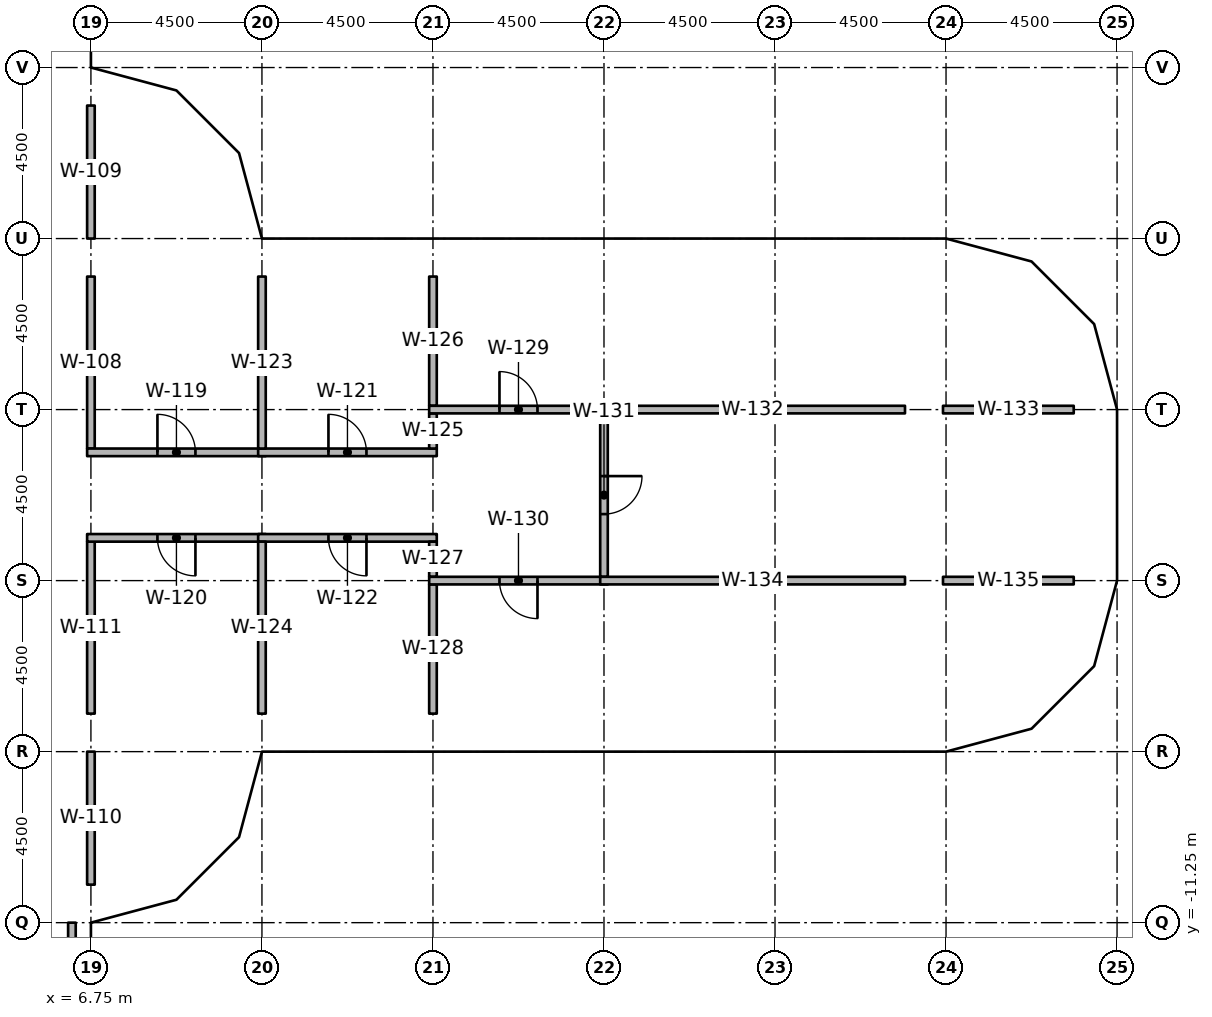
"""IFC4 building model, lengths in metres.
Left out: names, types, materials, properties, quantities, classifications, styles, units other than length and angle.
Written with IfcOpenShell. Run it as: python <this file> out.ifc"""

import sys

from ifc_helpers import new_model, si_unit, direction, frame, frame_2d, origin, origin_2d, place, context, subcontext, project, spatial, rectangle, extrude, element, fill, save


model = new_model("IFC4")
c1 = context("Model", 3, precision=1e-05, world=origin(), true_north=direction((0.0, 1.0)))
c2 = subcontext(c1, "Body", "Model", "MODEL_VIEW")
j1 = project(units=[si_unit("LENGTHUNIT", "METRE"), si_unit("PLANEANGLEUNIT", "RADIAN")], contexts=[c1])
p1 = place(None, origin())
s1 = spatial("IfcSite", under=j1, at=p1, CompositionType="ELEMENT")
p2 = place(p1, origin())
s2 = spatial("IfcBuilding", under=s1, at=p2, CompositionType="ELEMENT")
p3 = place(p2, frame((0.0, 0.0, 27.0)))
s3 = spatial("IfcBuildingStorey", under=s2, at=p3, CompositionType="ELEMENT", Elevation=27.0)
for number, where, z_axis, x_axis in (
    (1, (6.25, -10.75, 0.0), (0.0, 0.0, 1.0), (1.0, 0.0, 0.0)),
    (2, (6.25, -6.25, 0.0), (0.0, 0.0, 1.0), (1.0, 0.0, 0.0)),
    (3, (6.25, 6.25, 0.0), (0.0, 0.0, 1.0), (1.0, 0.0, 0.0)),
    (4, (6.25, 10.75, 0.0), (0.0, 0.0, 1.0), (1.0, 0.0, 0.0)),
    (5, (10.75, -6.25, 0.0), (0.0, 0.0, 1.0), (1.0, 0.0, 0.0)),
    (6, (10.75, 6.25, 0.0), (0.0, 0.0, 1.0), (1.0, 0.0, 0.0)),
    (7, (15.75, -6.25, 0.0), (0.0, 0.0, 1.0), (1.0, 0.0, 0.0)),
    (8, (15.75, 6.25, 0.0), (0.0, 0.0, 1.0), (1.0, 0.0, 0.0)),
    (9, (20.25, -6.11, 0.0), (0.0, 0.0, 1.0), (1.0, 0.0, 0.0)),
    (10, (20.25, 6.11, 0.0), (0.0, 0.0, 1.0), (1.0, 0.0, 0.0)),
    (11, (24.75, -6.11, 0.0), (0.0, 0.0, 1.0), (1.0, 0.0, 0.0)),
    (12, (24.75, 6.11, 0.0), (0.0, 0.0, 1.0), (1.0, 0.0, 0.0)),
    (13, (28.908, -5.475, 0.0), (0.0, 0.0, 1.0), (1.0, 0.0, 0.0)),
    (14, (28.67, -2.25, 0.0), (0.0, 0.0, 1.0), (1.0, 0.0, 0.0)),
    (15, (28.67, 2.25, 0.0), (0.0, 0.0, 1.0), (1.0, 0.0, 0.0)),
    (16, (28.908, 5.475, 0.0), (0.0, 0.0, 1.0), (1.0, 0.0, 0.0)),
    (17, (33.11, -2.25, 0.0), (0.0, 0.0, 1.0), (1.0, 0.0, 0.0)),
    (18, (33.11, 2.25, 0.0), (0.0, 0.0, 1.0), (1.0, 0.0, 0.0)),
):
    element("IfcColumn", number, at=place(p3, frame(where, z_axis=z_axis, x_axis=x_axis)), inside=s3, PredefinedType="COLUMN", context=c2, shape_type="SweptSolid", body=[
        extrude(rectangle(XDim=1.0, YDim=1.0, at=origin_2d()), origin(), (0.0, 0.0, 1.0), 4.05),
    ])
p4 = place(p3, frame((6.25, -15.25, 0.0), z_axis=(0.0, 0.0, 1.0), x_axis=(0.0, 1.0, 0.0)))
e19 = element("IfcWall", 19, at=p4, inside=s3, PredefinedType="SOLIDWALL", context=c2, shape_type="SweptSolid", body=[
    extrude(rectangle(XDim=4.0, YDim=0.2, at=frame_2d((2.0, 0.0))), origin(), (0.0, 0.0, 1.0), 3.15),
])
p5 = place(p4, frame((1.1, 0.0, 0.0)))
e20 = element("IfcOpeningElement", 20, at=p5, cuts=e19, PredefinedType="OPENING", context=c2, shape_type="SweptSolid", body=[
    extrude(rectangle(XDim=1.8, YDim=2.4, at=frame_2d((0.9, 1.2))), frame((0.0, 0.11, 0.0), z_axis=(0.0, -1.0, 0.0), x_axis=(1.0, 0.0, 0.0)), (0.0, 0.0, 1.0), 0.22),
])
p6 = place(p3, frame((6.75, 1.225, 0.0), z_axis=(0.0, 0.0, 1.0), x_axis=(0.0, 1.0, 0.0)))
e21 = element("IfcWall", 21, at=p6, inside=s3, PredefinedType="PARTITIONING", context=c2, shape_type="SweptSolid", body=[
    extrude(rectangle(XDim=4.525, YDim=0.2, at=frame_2d((2.262, 0.0))), origin(), (0.0, 0.0, 1.0), 3.131),
])
for number, where, z_axis, x_axis in (
    (22, (6.75, 6.75, 0.0), (0.0, 0.0, 1.0), (0.0, 1.0, 0.0)),
    (23, (6.75, -10.25, 0.0), (0.0, 0.0, 1.0), (0.0, 1.0, 0.0)),
):
    element("IfcWall", number, at=place(p3, frame(where, z_axis=z_axis, x_axis=x_axis)), inside=s3, PredefinedType="PARTITIONING", context=c2, shape_type="SweptSolid", body=[
        extrude(rectangle(XDim=3.5, YDim=0.2, at=frame_2d((1.75, 0.0))), origin(), (0.0, 0.0, 1.0), 3.131),
    ])
p7 = place(p3, frame((6.75, -5.75, 0.0), z_axis=(0.0, 0.0, 1.0), x_axis=(0.0, 1.0, 0.0)))
e24 = element("IfcWall", 24, at=p7, inside=s3, PredefinedType="PARTITIONING", context=c2, shape_type="SweptSolid", body=[
    extrude(rectangle(XDim=4.525, YDim=0.2, at=frame_2d((2.262, 0.0))), origin(), (0.0, 0.0, 1.0), 3.131),
])
p8 = place(p3, frame((6.65, 1.125, 0.0), z_axis=(0.0, 0.0, 1.0), x_axis=(1.0, 0.0, 0.0)))
e25 = element("IfcWall", 25, at=p8, inside=s3, PredefinedType="PARTITIONING", context=c2, shape_type="SweptSolid", body=[
    extrude(rectangle(XDim=4.7, YDim=0.2, at=frame_2d((2.35, 0.0))), origin(), (0.0, 0.0, 1.0), 3.131),
])
p9 = place(p8, frame((1.85, 0.0, 0.0)))
e26 = element("IfcOpeningElement", 26, at=p9, cuts=e25, PredefinedType="OPENING", context=c2, shape_type="SweptSolid", body=[
    extrude(rectangle(XDim=1.0, YDim=2.1, at=frame_2d((0.5, 1.05))), frame((0.0, 0.11, 0.0), z_axis=(0.0, -1.0, 0.0), x_axis=(1.0, 0.0, 0.0)), (0.0, 0.0, 1.0), 0.22),
])
p10 = place(p3, frame((11.35, -1.125, 0.0), z_axis=(0.0, 0.0, 1.0), x_axis=(-1.0, 0.0, 0.0)))
e27 = element("IfcWall", 27, at=p10, inside=s3, PredefinedType="PARTITIONING", context=c2, shape_type="SweptSolid", body=[
    extrude(rectangle(XDim=4.7, YDim=0.2, at=frame_2d((2.35, 0.0))), origin(), (0.0, 0.0, 1.0), 3.131),
])
p11 = place(p10, frame((1.85, 0.0, 0.0)))
e28 = element("IfcOpeningElement", 28, at=p11, cuts=e27, PredefinedType="OPENING", context=c2, shape_type="SweptSolid", body=[
    extrude(rectangle(XDim=1.0, YDim=2.1, at=frame_2d((0.5, 1.05))), frame((0.0, 0.11, 0.0), z_axis=(0.0, -1.0, 0.0), x_axis=(1.0, 0.0, 0.0)), (0.0, 0.0, 1.0), 0.22),
])
p12 = place(p3, frame((11.15, 1.125, 0.0), z_axis=(0.0, 0.0, 1.0), x_axis=(1.0, 0.0, 0.0)))
e29 = element("IfcWall", 29, at=p12, inside=s3, PredefinedType="PARTITIONING", context=c2, shape_type="SweptSolid", body=[
    extrude(rectangle(XDim=4.7, YDim=0.2, at=frame_2d((2.35, 0.0))), origin(), (0.0, 0.0, 1.0), 3.131),
])
p13 = place(p12, frame((1.85, 0.0, 0.0)))
e30 = element("IfcOpeningElement", 30, at=p13, cuts=e29, PredefinedType="OPENING", context=c2, shape_type="SweptSolid", body=[
    extrude(rectangle(XDim=1.0, YDim=2.1, at=frame_2d((0.5, 1.05))), frame((0.0, 0.11, 0.0), z_axis=(0.0, -1.0, 0.0), x_axis=(1.0, 0.0, 0.0)), (0.0, 0.0, 1.0), 0.22),
])
p14 = place(p3, frame((15.85, -1.125, 0.0), z_axis=(0.0, 0.0, 1.0), x_axis=(-1.0, 0.0, 0.0)))
e31 = element("IfcWall", 31, at=p14, inside=s3, PredefinedType="PARTITIONING", context=c2, shape_type="SweptSolid", body=[
    extrude(rectangle(XDim=4.7, YDim=0.2, at=frame_2d((2.35, 0.0))), origin(), (0.0, 0.0, 1.0), 3.131),
])
p15 = place(p14, frame((1.85, 0.0, 0.0)))
e32 = element("IfcOpeningElement", 32, at=p15, cuts=e31, PredefinedType="OPENING", context=c2, shape_type="SweptSolid", body=[
    extrude(rectangle(XDim=1.0, YDim=2.1, at=frame_2d((0.5, 1.05))), frame((0.0, 0.11, 0.0), z_axis=(0.0, -1.0, 0.0), x_axis=(1.0, 0.0, 0.0)), (0.0, 0.0, 1.0), 0.22),
])
for number, where, z_axis, x_axis in (
    (33, (11.25, 1.225, 0.0), (0.0, 0.0, 1.0), (0.0, 1.0, 0.0)),
    (34, (11.25, -5.75, 0.0), (0.0, 0.0, 1.0), (0.0, 1.0, 0.0)),
):
    element("IfcWall", number, at=place(p3, frame(where, z_axis=z_axis, x_axis=x_axis)), inside=s3, PredefinedType="PARTITIONING", context=c2, shape_type="SweptSolid", body=[
        extrude(rectangle(XDim=4.525, YDim=0.2, at=frame_2d((2.262, 0.0))), origin(), (0.0, 0.0, 1.0), 3.131),
    ])
p16 = place(p3, frame((15.75, 1.225, 0.0), z_axis=(0.0, 0.0, 1.0), x_axis=(0.0, 1.0, 0.0)))
e35 = element("IfcWall", 35, at=p16, inside=s3, PredefinedType="PARTITIONING", context=c2, shape_type="SweptSolid", body=[
    extrude(rectangle(XDim=0.925, YDim=0.2, at=frame_2d((0.462, 0.0))), origin(), (0.0, 0.0, 1.0), 3.131),
])
p17 = place(p3, frame((15.75, 2.35, 0.0), z_axis=(0.0, 0.0, 1.0), x_axis=(0.0, 1.0, 0.0)))
e36 = element("IfcWall", 36, at=p17, inside=s3, PredefinedType="PARTITIONING", context=c2, shape_type="SweptSolid", body=[
    extrude(rectangle(XDim=3.4, YDim=0.2, at=frame_2d((1.7, 0.0))), origin(), (0.0, 0.0, 1.0), 3.131),
])
p18 = place(p3, frame((15.75, -2.15, 0.0), z_axis=(0.0, 0.0, 1.0), x_axis=(0.0, 1.0, 0.0)))
e37 = element("IfcWall", 37, at=p18, inside=s3, PredefinedType="PARTITIONING", context=c2, shape_type="SweptSolid", body=[
    extrude(rectangle(XDim=0.925, YDim=0.2, at=frame_2d((0.462, 0.0))), origin(), (0.0, 0.0, 1.0), 3.131),
])
p19 = place(p3, frame((15.75, -5.75, 0.0), z_axis=(0.0, 0.0, 1.0), x_axis=(0.0, 1.0, 0.0)))
e38 = element("IfcWall", 38, at=p19, inside=s3, PredefinedType="PARTITIONING", context=c2, shape_type="SweptSolid", body=[
    extrude(rectangle(XDim=3.4, YDim=0.2, at=frame_2d((1.7, 0.0))), origin(), (0.0, 0.0, 1.0), 3.131),
])
p20 = place(p3, frame((15.65, 2.25, 0.0), z_axis=(0.0, 0.0, 1.0), x_axis=(1.0, 0.0, 0.0)))
e39 = element("IfcWall", 39, at=p20, inside=s3, PredefinedType="PARTITIONING", context=c2, shape_type="SweptSolid", body=[
    extrude(rectangle(XDim=4.7, YDim=0.2, at=frame_2d((2.35, 0.0))), origin(), (0.0, 0.0, 1.0), 3.131),
])
p21 = place(p20, frame((1.85, 0.0, 0.0)))
e40 = element("IfcOpeningElement", 40, at=p21, cuts=e39, PredefinedType="OPENING", context=c2, shape_type="SweptSolid", body=[
    extrude(rectangle(XDim=1.0, YDim=2.1, at=frame_2d((0.5, 1.05))), frame((0.0, 0.11, 0.0), z_axis=(0.0, -1.0, 0.0), x_axis=(1.0, 0.0, 0.0)), (0.0, 0.0, 1.0), 0.22),
])
p22 = place(p3, frame((20.35, -2.25, 0.0), z_axis=(0.0, 0.0, 1.0), x_axis=(-1.0, 0.0, 0.0)))
e41 = element("IfcWall", 41, at=p22, inside=s3, PredefinedType="PARTITIONING", context=c2, shape_type="SweptSolid", body=[
    extrude(rectangle(XDim=4.7, YDim=0.2, at=frame_2d((2.35, 0.0))), origin(), (0.0, 0.0, 1.0), 3.131),
])
p23 = place(p22, frame((1.85, 0.0, 0.0)))
e42 = element("IfcOpeningElement", 42, at=p23, cuts=e41, PredefinedType="OPENING", context=c2, shape_type="SweptSolid", body=[
    extrude(rectangle(XDim=1.0, YDim=2.1, at=frame_2d((0.5, 1.05))), frame((0.0, 0.11, 0.0), z_axis=(0.0, -1.0, 0.0), x_axis=(1.0, 0.0, 0.0)), (0.0, 0.0, 1.0), 0.22),
])
p24 = place(p3, frame((20.25, 2.15, 0.0), z_axis=(0.0, 0.0, 1.0), x_axis=(0.0, -1.0, 0.0)))
e43 = element("IfcWall", 43, at=p24, inside=s3, PredefinedType="PARTITIONING", context=c2, shape_type="SweptSolid", body=[
    extrude(rectangle(XDim=4.3, YDim=0.2, at=frame_2d((2.15, 0.0))), origin(), (0.0, 0.0, 1.0), 3.131),
])
p25 = place(p24, frame((1.65, 0.0, 0.0)))
e44 = element("IfcOpeningElement", 44, at=p25, cuts=e43, PredefinedType="OPENING", context=c2, shape_type="SweptSolid", body=[
    extrude(rectangle(XDim=1.0, YDim=2.1, at=frame_2d((0.5, 1.05))), frame((0.0, 0.11, 0.0), z_axis=(0.0, -1.0, 0.0), x_axis=(1.0, 0.0, 0.0)), (0.0, 0.0, 1.0), 0.22),
])
p26 = place(p3, frame((20.15, 2.25, 0.0), z_axis=(0.0, 0.0, 1.0), x_axis=(1.0, 0.0, 0.0)))
e45 = element("IfcWall", 45, at=p26, inside=s3, PredefinedType="PARTITIONING", context=c2, shape_type="SweptSolid", body=[
    extrude(rectangle(XDim=8.02, YDim=0.2, at=frame_2d((4.01, 0.0))), origin(), (0.0, 0.0, 1.0), 3.131),
])
p27 = place(p3, frame((29.17, 2.25, 0.0), z_axis=(0.0, 0.0, 1.0), x_axis=(1.0, 0.0, 0.0)))
e46 = element("IfcWall", 46, at=p27, inside=s3, PredefinedType="PARTITIONING", context=c2, shape_type="SweptSolid", body=[
    extrude(rectangle(XDim=3.44, YDim=0.2, at=frame_2d((1.72, 0.0))), origin(), (0.0, 0.0, 1.0), 3.131),
])
p28 = place(p3, frame((20.15, -2.25, 0.0), z_axis=(0.0, 0.0, 1.0), x_axis=(1.0, 0.0, 0.0)))
e47 = element("IfcWall", 47, at=p28, inside=s3, PredefinedType="PARTITIONING", context=c2, shape_type="SweptSolid", body=[
    extrude(rectangle(XDim=8.02, YDim=0.2, at=frame_2d((4.01, 0.0))), origin(), (0.0, 0.0, 1.0), 3.131),
])
p29 = place(p3, frame((29.17, -2.25, 0.0), z_axis=(0.0, 0.0, 1.0), x_axis=(1.0, 0.0, 0.0)))
e48 = element("IfcWall", 48, at=p29, inside=s3, PredefinedType="PARTITIONING", context=c2, shape_type="SweptSolid", body=[
    extrude(rectangle(XDim=3.44, YDim=0.2, at=frame_2d((1.72, 0.0))), origin(), (0.0, 0.0, 1.0), 3.131),
])
p30 = place(p25, origin())
e49 = element("IfcDoor", 49, at=p30, inside=s3, OperationType="SINGLE_SWING_RIGHT", PredefinedType="DOOR", context=c2, shape_type="SweptSolid", body=[
    extrude(rectangle(XDim=1.0, YDim=2.1, at=frame_2d((0.5, 1.05))), frame((0.0, 0.025, 0.0), z_axis=(0.0, -1.0, 0.0), x_axis=(1.0, 0.0, 0.0)), (0.0, 0.0, 1.0), 0.05),
])
fill(e44, e49)
p31 = place(p21, origin())
e50 = element("IfcDoor", 50, at=p31, inside=s3, OperationType="SINGLE_SWING_LEFT", PredefinedType="DOOR", context=c2, shape_type="SweptSolid", body=[
    extrude(rectangle(XDim=1.0, YDim=2.1, at=frame_2d((0.5, 1.05))), frame((0.0, 0.025, 0.0), z_axis=(0.0, -1.0, 0.0), x_axis=(1.0, 0.0, 0.0)), (0.0, 0.0, 1.0), 0.05),
])
fill(e40, e50)
p32 = place(p9, origin())
e51 = element("IfcDoor", 51, at=p32, inside=s3, OperationType="SINGLE_SWING_RIGHT", PredefinedType="DOOR", context=c2, shape_type="SweptSolid", body=[
    extrude(rectangle(XDim=1.0, YDim=2.1, at=frame_2d((0.5, 1.05))), frame((0.0, 0.025, 0.0), z_axis=(0.0, -1.0, 0.0), x_axis=(1.0, 0.0, 0.0)), (0.0, 0.0, 1.0), 0.05),
])
fill(e26, e51)
p33 = place(p13, origin())
e52 = element("IfcDoor", 52, at=p33, inside=s3, OperationType="SINGLE_SWING_RIGHT", PredefinedType="DOOR", context=c2, shape_type="SweptSolid", body=[
    extrude(rectangle(XDim=1.0, YDim=2.1, at=frame_2d((0.5, 1.05))), frame((0.0, 0.025, 0.0), z_axis=(0.0, -1.0, 0.0), x_axis=(1.0, 0.0, 0.0)), (0.0, 0.0, 1.0), 0.05),
])
fill(e30, e52)
p34 = place(p23, origin())
e53 = element("IfcDoor", 53, at=p34, inside=s3, OperationType="SINGLE_SWING_RIGHT", PredefinedType="DOOR", context=c2, shape_type="SweptSolid", body=[
    extrude(rectangle(XDim=1.0, YDim=2.1, at=frame_2d((0.5, 1.05))), frame((0.0, 0.025, 0.0), z_axis=(0.0, -1.0, 0.0), x_axis=(1.0, 0.0, 0.0)), (0.0, 0.0, 1.0), 0.05),
])
fill(e42, e53)
p35 = place(p11, origin())
e54 = element("IfcDoor", 54, at=p35, inside=s3, OperationType="SINGLE_SWING_RIGHT", PredefinedType="DOOR", context=c2, shape_type="SweptSolid", body=[
    extrude(rectangle(XDim=1.0, YDim=2.1, at=frame_2d((0.5, 1.05))), frame((0.0, 0.025, 0.0), z_axis=(0.0, -1.0, 0.0), x_axis=(1.0, 0.0, 0.0)), (0.0, 0.0, 1.0), 0.05),
])
fill(e28, e54)
p36 = place(p15, origin())
e55 = element("IfcDoor", 55, at=p36, inside=s3, OperationType="SINGLE_SWING_RIGHT", PredefinedType="DOOR", context=c2, shape_type="SweptSolid", body=[
    extrude(rectangle(XDim=1.0, YDim=2.1, at=frame_2d((0.5, 1.05))), frame((0.0, 0.025, 0.0), z_axis=(0.0, -1.0, 0.0), x_axis=(1.0, 0.0, 0.0)), (0.0, 0.0, 1.0), 0.05),
])
fill(e32, e55)
save(model, sys.argv[1])
